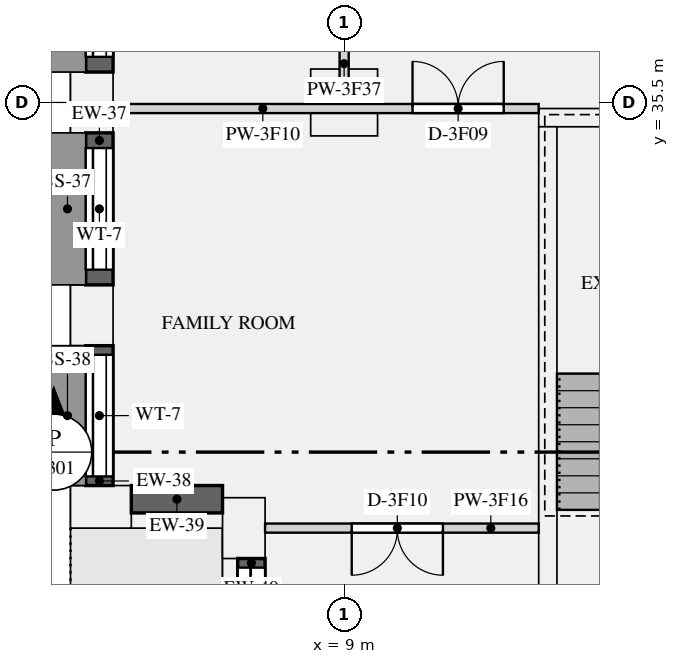
"""IFC4 building model, lengths in metres.
Left out: names, types, materials, properties, quantities, classifications, styles, units other than length and angle.
Written with IfcOpenShell. Run it as: python <this file> out.ifc"""

import sys

from ifc_helpers import new_model, si_unit, direction, frame, frame_2d, origin, origin_2d, place, context, subcontext, project, spatial, rectangle, extrude, element, fill, save


model = new_model("IFC4")
c1 = context("Model", 3, precision=1e-05, world=origin(), true_north=direction((0.0, 1.0)))
c2 = subcontext(c1, "Body", "Model", "MODEL_VIEW")
j1 = project(units=[si_unit("LENGTHUNIT", "METRE"), si_unit("PLANEANGLEUNIT", "RADIAN")], contexts=[c1])
p1 = place(None, origin())
s1 = spatial("IfcSite", under=j1, at=p1, CompositionType="ELEMENT")
p2 = place(p1, origin())
s2 = spatial("IfcBuilding", under=s1, at=p2, CompositionType="ELEMENT")
p3 = place(p2, frame((0.0, 0.0, 179.1)))
s3 = spatial("IfcBuildingStorey", under=s2, at=p3, CompositionType="ELEMENT", Elevation=179.1)
for number, where, z_axis, x_axis in (
    (1, (4.85, 35.5, 0.0), (0.0, 0.0, 1.0), (0.0, -1.0, 0.0)),
    (2, (4.85, 32.0, 0.0), (0.0, 0.0, 1.0), (0.0, -1.0, 0.0)),
    (3, (5.0, 28.85, 0.0), (0.0, 0.0, 1.0), (1.0, 0.0, 0.0)),
    (4, (7.35, 28.5, 0.0), (0.0, 0.0, 1.0), (0.0, -1.0, 0.0)),
):
    element("IfcColumn", number, at=place(p3, frame(where, z_axis=z_axis, x_axis=x_axis)), inside=s3, PredefinedType="USERDEFINED", context=c2, shape_type="SweptSolid", body=[
        extrude(rectangle(XDim=1.0, YDim=0.7, at=origin_2d()), origin(), (0.0, 0.0, 1.0), 3.15),
    ])
p4 = place(p3, frame((9.0, 35.5, 0.0), z_axis=(0.0, 0.0, 1.0), x_axis=(1.0, 0.0, 0.0)))
e5 = element("IfcColumn", 5, at=p4, inside=s3, PredefinedType="COLUMN", context=c2, shape_type="SweptSolid", body=[
    extrude(rectangle(XDim=1.1, YDim=1.1, at=origin_2d()), origin(), (0.0, 0.0, 1.0), 3.15),
])
p5 = place(p3, frame((12.2, 35.25, 0.0), z_axis=(0.0, 0.0, 1.0), x_axis=(1.0, 0.0, 0.0)))
e6 = element("IfcWall", 6, at=p5, inside=s3, PredefinedType="SHEAR", context=c2, shape_type="SweptSolid", body=[
    extrude(rectangle(XDim=3.6, YDim=0.3, at=frame_2d((1.8, 0.0))), origin(), (0.0, 0.0, 1.0), 3.15),
])
p6 = place(p3, frame((12.35, 27.3, 0.0), z_axis=(0.0, 0.0, 1.0), x_axis=(0.0, 1.0, 0.0)))
e7 = element("IfcWall", 7, at=p6, inside=s3, PredefinedType="SHEAR", context=c2, shape_type="SweptSolid", body=[
    extrude(rectangle(XDim=7.8, YDim=0.3, at=frame_2d((3.9, 0.0))), origin(), (0.0, 0.0, 1.0), 3.15),
])
p7 = place(p3, frame((4.975, 38.0, 0.9), z_axis=(0.0, 0.0, 1.0), x_axis=(0.0, -1.0, 0.0)))
e8 = element("IfcWall", 8, at=p7, inside=s3, PredefinedType="SOLIDWALL", context=c2, shape_type="SweptSolid", body=[
    extrude(rectangle(XDim=2.0, YDim=0.45, at=frame_2d((1.0, 0.0))), origin(), (0.0, 0.0, 1.0), 1.93),
])
p8 = place(p7, frame((0.25, 0.0, 0.15)))
e9 = element("IfcOpeningElement", 9, at=p8, cuts=e8, PredefinedType="OPENING", context=c2, shape_type="SweptSolid", body=[
    extrude(rectangle(XDim=1.5, YDim=1.5, at=frame_2d((0.75, 0.75))), frame((0.0, 0.235, 0.0), z_axis=(0.0, -1.0, 0.0), x_axis=(1.0, 0.0, 0.0)), (0.0, 0.0, 1.0), 0.47),
])
p9 = place(p3, frame((4.975, 35.0, 0.9), z_axis=(0.0, 0.0, 1.0), x_axis=(0.0, -1.0, 0.0)))
e10 = element("IfcWall", 10, at=p9, inside=s3, PredefinedType="SOLIDWALL", context=c2, shape_type="SweptSolid", body=[
    extrude(rectangle(XDim=2.5, YDim=0.45, at=frame_2d((1.25, 0.0))), origin(), (0.0, 0.0, 1.0), 1.93),
])
p10 = place(p9, frame((0.25, 0.0, 0.15)))
e11 = element("IfcOpeningElement", 11, at=p10, cuts=e10, PredefinedType="OPENING", context=c2, shape_type="SweptSolid", body=[
    extrude(rectangle(XDim=2.0, YDim=1.5, at=frame_2d((1.0, 0.75))), frame((0.0, 0.235, 0.0), z_axis=(0.0, -1.0, 0.0), x_axis=(1.0, 0.0, 0.0)), (0.0, 0.0, 1.0), 0.47),
])
p11 = place(p3, frame((4.975, 31.5, 0.9), z_axis=(0.0, 0.0, 1.0), x_axis=(0.0, -1.0, 0.0)))
e12 = element("IfcWall", 12, at=p11, inside=s3, PredefinedType="SOLIDWALL", context=c2, shape_type="SweptSolid", body=[
    extrude(rectangle(XDim=2.3, YDim=0.45, at=frame_2d((1.15, 0.0))), origin(), (0.0, 0.0, 1.0), 1.93),
])
p12 = place(p11, frame((0.15, 0.0, 0.15)))
e13 = element("IfcOpeningElement", 13, at=p12, cuts=e12, PredefinedType="OPENING", context=c2, shape_type="SweptSolid", body=[
    extrude(rectangle(XDim=2.0, YDim=1.5, at=frame_2d((1.0, 0.75))), frame((0.0, 0.235, 0.0), z_axis=(0.0, -1.0, 0.0), x_axis=(1.0, 0.0, 0.0)), (0.0, 0.0, 1.0), 0.47),
])
p13 = place(p3, frame((5.5, 28.975, 0.9), z_axis=(0.0, 0.0, 1.0), x_axis=(1.0, 0.0, 0.0)))
e14 = element("IfcWall", 14, at=p13, inside=s3, PredefinedType="SOLIDWALL", context=c2, shape_type="SweptSolid", body=[
    extrude(rectangle(XDim=1.5, YDim=0.45, at=frame_2d((0.75, 0.0))), origin(), (0.0, 0.0, 1.0), 1.93),
])
p14 = place(p3, frame((7.475, 28.0, 0.0), z_axis=(0.0, 0.0, 1.0), x_axis=(0.0, -1.0, 0.0)))
e15 = element("IfcWall", 15, at=p14, inside=s3, PredefinedType="SOLIDWALL", context=c2, shape_type="SweptSolid", body=[
    extrude(rectangle(XDim=3.0, YDim=0.45, at=frame_2d((1.5, 0.0))), origin(), (0.0, 0.0, 1.0), 2.83),
])
p15 = place(p14, frame((0.15, 0.0, 0.0)))
e16 = element("IfcOpeningElement", 16, at=p15, cuts=e15, PredefinedType="OPENING", context=c2, shape_type="SweptSolid", body=[
    extrude(rectangle(XDim=2.7, YDim=2.3, at=frame_2d((1.35, 1.15))), frame((0.0, 0.235, 0.0), z_axis=(0.0, -1.0, 0.0), x_axis=(1.0, 0.0, 0.0)), (0.0, 0.0, 1.0), 0.47),
])
p16 = place(p3, frame((5.2, 35.4, 0.0), z_axis=(0.0, 0.0, 1.0), x_axis=(1.0, 0.0, 0.0)))
e17 = element("IfcWall", 17, at=p16, inside=s3, PredefinedType="PARTITIONING", context=c2, shape_type="SweptSolid", body=[
    extrude(rectangle(XDim=7.0, YDim=0.15, at=frame_2d((3.5, 0.0))), origin(), (0.0, 0.0, 1.0), 2.83),
])
p17 = place(p16, frame((4.925, 0.0, 0.0)))
e18 = element("IfcOpeningElement", 18, at=p17, cuts=e17, PredefinedType="OPENING", context=c2, shape_type="SweptSolid", body=[
    extrude(rectangle(XDim=1.5, YDim=2.1, at=frame_2d((0.75, 1.05))), frame((0.0, 0.085, 0.0), z_axis=(0.0, -1.0, 0.0), x_axis=(1.0, 0.0, 0.0)), (0.0, 0.0, 1.0), 0.17),
])
p18 = place(p3, frame((7.7, 28.5, 0.0), z_axis=(0.0, 0.0, 1.0), x_axis=(1.0, 0.0, 0.0)))
e19 = element("IfcWall", 19, at=p18, inside=s3, PredefinedType="PARTITIONING", context=c2, shape_type="SweptSolid", body=[
    extrude(rectangle(XDim=4.5, YDim=0.15, at=frame_2d((2.25, 0.0))), origin(), (0.0, 0.0, 1.0), 2.83),
])
p19 = place(p18, frame((1.425, 0.0, 0.0)))
e20 = element("IfcOpeningElement", 20, at=p19, cuts=e19, PredefinedType="OPENING", context=c2, shape_type="SweptSolid", body=[
    extrude(rectangle(XDim=1.5, YDim=2.1, at=frame_2d((0.75, 1.05))), frame((0.0, 0.085, 0.0), z_axis=(0.0, -1.0, 0.0), x_axis=(1.0, 0.0, 0.0)), (0.0, 0.0, 1.0), 0.17),
])
p20 = place(p3, frame((9.0, 35.475, 0.0), z_axis=(0.0, 0.0, 1.0), x_axis=(0.0, 1.0, 0.0)))
e21 = element("IfcWall", 21, at=p20, inside=s3, PredefinedType="PARTITIONING", context=c2, shape_type="SweptSolid", body=[
    extrude(rectangle(XDim=2.825, YDim=0.15, at=frame_2d((1.413, 0.0))), origin(), (0.0, 0.0, 1.0), 2.83),
])
p21 = place(p20, frame((1.325, 0.0, 0.0)))
e22 = element("IfcOpeningElement", 22, at=p21, cuts=e21, PredefinedType="OPENING", context=c2, shape_type="SweptSolid", body=[
    extrude(rectangle(XDim=0.9, YDim=2.1, at=frame_2d((0.45, 1.05))), frame((0.0, 0.085, 0.0), z_axis=(0.0, -1.0, 0.0), x_axis=(1.0, 0.0, 0.0)), (0.0, 0.0, 1.0), 0.17),
])
p22 = place(p8, origin())
e23 = element("IfcWindow", 23, at=p22, inside=s3, PartitioningType="SINGLE_PANEL", PredefinedType="WINDOW", context=c2, shape_type="SweptSolid", body=[
    extrude(rectangle(XDim=1.5, YDim=1.5, at=frame_2d((0.75, 0.75))), frame((0.0, -0.065, 0.0), z_axis=(0.0, -1.0, 0.0), x_axis=(1.0, 0.0, 0.0)), (0.0, 0.0, 1.0), 0.06),
])
fill(e9, e23)
p23 = place(p10, origin())
e24 = element("IfcWindow", 24, at=p23, inside=s3, PartitioningType="SINGLE_PANEL", PredefinedType="WINDOW", context=c2, shape_type="SweptSolid", body=[
    extrude(rectangle(XDim=2.0, YDim=1.5, at=frame_2d((1.0, 0.75))), frame((0.0, -0.065, 0.0), z_axis=(0.0, -1.0, 0.0), x_axis=(1.0, 0.0, 0.0)), (0.0, 0.0, 1.0), 0.06),
])
fill(e11, e24)
p24 = place(p12, origin())
e25 = element("IfcWindow", 25, at=p24, inside=s3, PartitioningType="SINGLE_PANEL", PredefinedType="WINDOW", context=c2, shape_type="SweptSolid", body=[
    extrude(rectangle(XDim=2.0, YDim=1.5, at=frame_2d((1.0, 0.75))), frame((0.0, -0.065, 0.0), z_axis=(0.0, -1.0, 0.0), x_axis=(1.0, 0.0, 0.0)), (0.0, 0.0, 1.0), 0.06),
])
fill(e13, e25)
p25 = place(p15, origin())
e26 = element("IfcDoor", 26, at=p25, inside=s3, OperationType="SLIDING_TO_LEFT", PredefinedType="DOOR", context=c2, shape_type="SweptSolid", body=[
    extrude(rectangle(XDim=2.7, YDim=2.3, at=frame_2d((1.35, 1.15))), frame((0.0, -0.07, 0.0), z_axis=(0.0, -1.0, 0.0), x_axis=(1.0, 0.0, 0.0)), (0.0, 0.0, 1.0), 0.05),
])
fill(e16, e26)
p26 = place(p17, origin())
e27 = element("IfcDoor", 27, at=p26, inside=s3, OperationType="DOUBLE_DOOR_SINGLE_SWING", PredefinedType="DOOR", context=c2, shape_type="SweptSolid", body=[
    extrude(rectangle(XDim=1.5, YDim=2.1, at=frame_2d((0.75, 1.05))), frame((0.0, 0.025, 0.0), z_axis=(0.0, -1.0, 0.0), x_axis=(1.0, 0.0, 0.0)), (0.0, 0.0, 1.0), 0.05),
])
fill(e18, e27)
p27 = place(p19, frame((1.5, 0.0, 0.0), z_axis=(0.0, 0.0, 1.0), x_axis=(-1.0, 0.0, 0.0)))
e28 = element("IfcDoor", 28, at=p27, inside=s3, OperationType="DOUBLE_DOOR_SINGLE_SWING", PredefinedType="DOOR", context=c2, shape_type="SweptSolid", body=[
    extrude(rectangle(XDim=1.5, YDim=2.1, at=frame_2d((0.75, 1.05))), frame((0.0, 0.025, 0.0), z_axis=(0.0, -1.0, 0.0), x_axis=(1.0, 0.0, 0.0)), (0.0, 0.0, 1.0), 0.05),
])
fill(e20, e28)
save(model, sys.argv[1])
